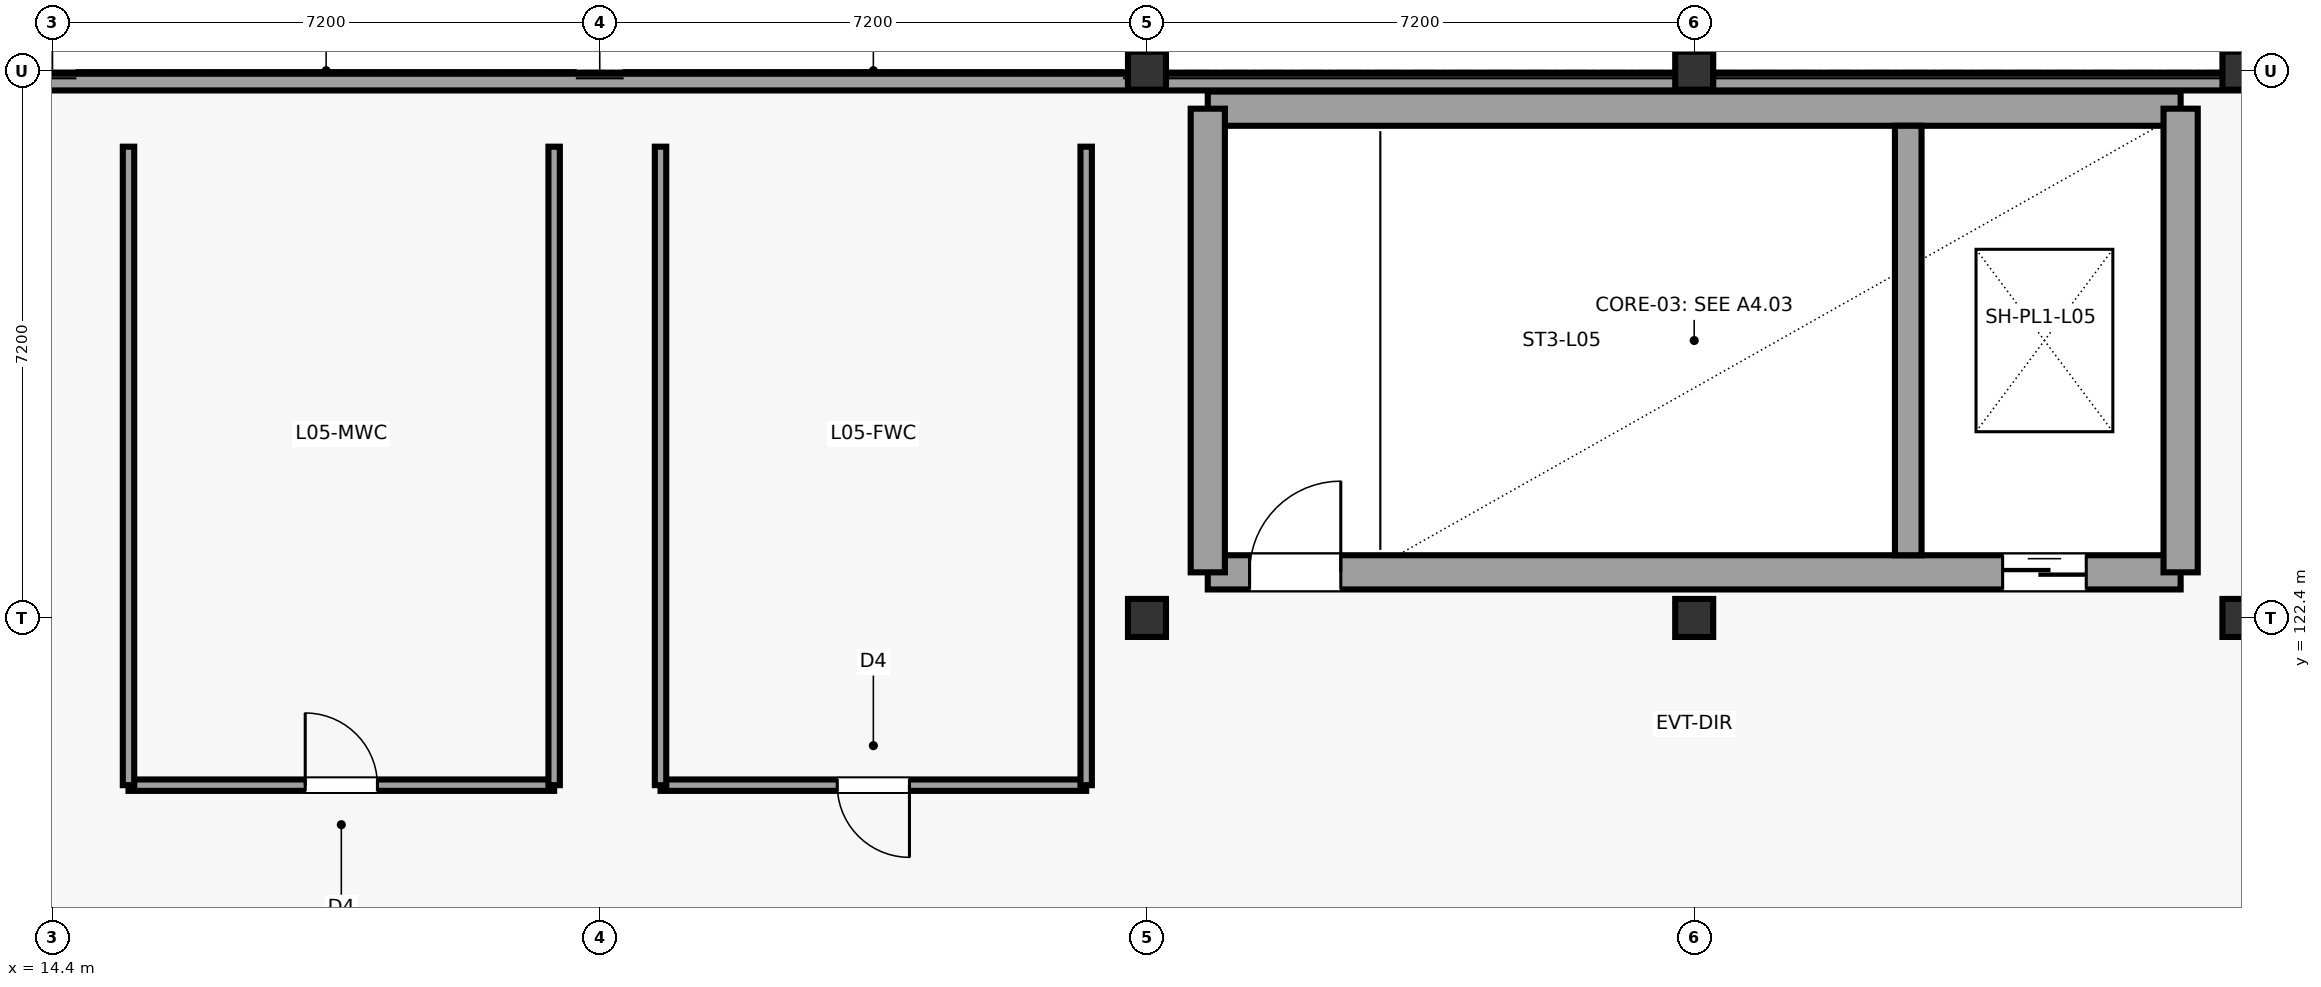
"""IFC4 building model, lengths in metres.
Left out: names, types, materials, properties, quantities, classifications, styles, units other than length and angle.
Written with IfcOpenShell. Run it as: python <this file> out.ifc"""

import sys

from ifc_helpers import new_model, si_unit, direction, frame, frame_2d, origin, origin_2d, place, context, subcontext, project, spatial, rectangle, extrude, element, fill, save


model = new_model("IFC4")
c1 = context("Model", 3, precision=1e-05, world=origin(), true_north=direction((0.0, 1.0)))
c2 = subcontext(c1, "Body", "Model", "MODEL_VIEW")
j1 = project(units=[si_unit("LENGTHUNIT", "METRE"), si_unit("PLANEANGLEUNIT", "RADIAN")], contexts=[c1])
p1 = place(None, origin())
s1 = spatial("IfcSite", under=j1, at=p1, CompositionType="ELEMENT")
p2 = place(p1, origin())
s2 = spatial("IfcBuilding", under=s1, at=p2, CompositionType="ELEMENT")
p3 = place(p2, frame((0.0, 0.0, 23.0)))
s3 = spatial("IfcBuildingStorey", under=s2, at=p3, CompositionType="ELEMENT", Elevation=23.0)
for number, where, z_axis, x_axis in (
    (1, (28.8, 122.4, 0.0), (0.0, 0.0, 1.0), (1.0, 0.0, 0.0)),
    (2, (28.8, 129.6, 0.0), (0.0, 0.0, 1.0), (1.0, 0.0, 0.0)),
    (3, (36.0, 122.4, 0.0), (0.0, 0.0, 1.0), (1.0, 0.0, 0.0)),
    (4, (36.0, 129.6, 0.0), (0.0, 0.0, 1.0), (1.0, 0.0, 0.0)),
    (5, (43.2, 122.4, 0.0), (0.0, 0.0, 1.0), (1.0, 0.0, 0.0)),
    (6, (43.2, 129.6, 0.0), (0.0, 0.0, 1.0), (1.0, 0.0, 0.0)),
):
    element("IfcColumn", number, at=place(p3, frame(where, z_axis=z_axis, x_axis=x_axis)), inside=s3, PredefinedType="COLUMN", context=c2, shape_type="SweptSolid", body=[
        extrude(rectangle(XDim=0.5, YDim=0.5, at=origin_2d()), origin(), (0.0, 0.0, 1.0), 4.5),
    ])
p4 = place(p3, frame((29.6, 123.0, 0.0), z_axis=(0.0, 0.0, 1.0), x_axis=(1.0, 0.0, 0.0)))
e7 = element("IfcWall", 7, at=p4, inside=s3, PredefinedType="SHEAR", context=c2, shape_type="SweptSolid", body=[
    extrude(rectangle(XDim=12.8, YDim=0.45, at=frame_2d((6.4, 0.0))), origin(), (0.0, 0.0, 1.0), 4.28),
])
p5 = place(p4, frame((0.55, 0.0, 0.0)))
e8 = element("IfcOpeningElement", 8, at=p5, cuts=e7, PredefinedType="OPENING", context=c2, shape_type="SweptSolid", body=[
    extrude(rectangle(XDim=1.2, YDim=2.25, at=frame_2d((0.6, 1.125))), frame((0.0, 0.235, 0.0), z_axis=(0.0, -1.0, 0.0), x_axis=(1.0, 0.0, 0.0)), (0.0, 0.0, 1.0), 0.47),
])
p6 = place(p4, frame((10.458, 0.0, 0.0)))
e9 = element("IfcOpeningElement", 9, at=p6, cuts=e7, PredefinedType="OPENING", context=c2, shape_type="SweptSolid", body=[
    extrude(rectangle(XDim=1.1, YDim=2.2, at=frame_2d((0.55, 1.1))), frame((0.0, 0.235, 0.0), z_axis=(0.0, -1.0, 0.0), x_axis=(1.0, 0.0, 0.0)), (0.0, 0.0, 1.0), 0.47),
])
p7 = place(p3, frame((29.6, 129.1, 0.0), z_axis=(0.0, 0.0, 1.0), x_axis=(1.0, 0.0, 0.0)))
e10 = element("IfcWall", 10, at=p7, inside=s3, PredefinedType="SHEAR", context=c2, shape_type="SweptSolid", body=[
    extrude(rectangle(XDim=12.8, YDim=0.45, at=frame_2d((6.4, 0.0))), origin(), (0.0, 0.0, 1.0), 4.28),
])
for number, where, z_axis, x_axis in (
    (11, (29.6, 123.0, 0.0), (0.0, 0.0, 1.0), (0.0, 1.0, 0.0)),
    (12, (42.4, 123.0, 0.0), (0.0, 0.0, 1.0), (0.0, 1.0, 0.0)),
):
    element("IfcWall", number, at=place(p3, frame(where, z_axis=z_axis, x_axis=x_axis)), inside=s3, PredefinedType="SHEAR", context=c2, shape_type="SweptSolid", body=[
        extrude(rectangle(XDim=6.1, YDim=0.45, at=frame_2d((3.05, 0.0))), origin(), (0.0, 0.0, 1.0), 4.28),
    ])
p8 = place(p3, frame((38.816, 123.225, 0.0), z_axis=(0.0, 0.0, 1.0), x_axis=(0.0, 1.0, 0.0)))
e13 = element("IfcWall", 13, at=p8, inside=s3, PredefinedType="SHEAR", context=c2, shape_type="SweptSolid", body=[
    extrude(rectangle(XDim=5.65, YDim=0.35, at=frame_2d((2.825, 0.0))), origin(), (0.0, 0.0, 1.0), 4.28),
])
p9 = place(p3, frame((0.15, 129.45, 4.5), z_axis=(0.0, 0.0, 1.0), x_axis=(1.0, 0.0, 0.0)))
e14 = element("IfcWall", 14, at=p9, inside=s3, PredefinedType="PARAPET", context=c2, shape_type="SweptSolid", body=[
    extrude(rectangle(XDim=93.3, YDim=0.22, at=frame_2d((46.65, 0.0))), origin(), (0.0, 0.0, 1.0), 1.15),
])
p10 = place(p3, frame((15.4, 120.2, 0.0), z_axis=(0.0, 0.0, 1.0), x_axis=(1.0, 0.0, 0.0)))
e15 = element("IfcWall", 15, at=p10, inside=s3, PredefinedType="PARTITIONING", context=c2, shape_type="SweptSolid", body=[
    extrude(rectangle(XDim=5.6, YDim=0.15, at=frame_2d((2.8, 0.0))), origin(), (0.0, 0.0, 1.0), 3.34),
])
p11 = place(p10, frame((2.325, 0.0, 0.0)))
e16 = element("IfcOpeningElement", 16, at=p11, cuts=e15, PredefinedType="OPENING", context=c2, shape_type="SweptSolid", body=[
    extrude(rectangle(XDim=0.95, YDim=2.15, at=frame_2d((0.475, 1.075))), frame((0.0, 0.085, 0.0), z_axis=(0.0, -1.0, 0.0), x_axis=(1.0, 0.0, 0.0)), (0.0, 0.0, 1.0), 0.17),
])
for number, where, z_axis, x_axis in (
    (17, (21.0, 120.2, 0.0), (0.0, 0.0, 1.0), (0.0, 1.0, 0.0)),
    (18, (15.4, 128.6, 0.0), (0.0, 0.0, 1.0), (0.0, -1.0, 0.0)),
):
    element("IfcWall", number, at=place(p3, frame(where, z_axis=z_axis, x_axis=x_axis)), inside=s3, PredefinedType="PARTITIONING", context=c2, shape_type="SweptSolid", body=[
        extrude(rectangle(XDim=8.4, YDim=0.15, at=frame_2d((4.2, 0.0))), origin(), (0.0, 0.0, 1.0), 3.34),
    ])
p12 = place(p3, frame((22.4, 120.2, 0.0), z_axis=(0.0, 0.0, 1.0), x_axis=(1.0, 0.0, 0.0)))
e19 = element("IfcWall", 19, at=p12, inside=s3, PredefinedType="PARTITIONING", context=c2, shape_type="SweptSolid", body=[
    extrude(rectangle(XDim=5.6, YDim=0.15, at=frame_2d((2.8, 0.0))), origin(), (0.0, 0.0, 1.0), 3.34),
])
p13 = place(p12, frame((2.325, 0.0, 0.0)))
e20 = element("IfcOpeningElement", 20, at=p13, cuts=e19, PredefinedType="OPENING", context=c2, shape_type="SweptSolid", body=[
    extrude(rectangle(XDim=0.95, YDim=2.15, at=frame_2d((0.475, 1.075))), frame((0.0, 0.085, 0.0), z_axis=(0.0, -1.0, 0.0), x_axis=(1.0, 0.0, 0.0)), (0.0, 0.0, 1.0), 0.17),
])
for number, where, z_axis, x_axis in (
    (21, (28.0, 120.2, 0.0), (0.0, 0.0, 1.0), (0.0, 1.0, 0.0)),
    (22, (22.4, 128.6, 0.0), (0.0, 0.0, 1.0), (0.0, -1.0, 0.0)),
):
    element("IfcWall", number, at=place(p3, frame(where, z_axis=z_axis, x_axis=x_axis)), inside=s3, PredefinedType="PARTITIONING", context=c2, shape_type="SweptSolid", body=[
        extrude(rectangle(XDim=8.4, YDim=0.15, at=frame_2d((4.2, 0.0))), origin(), (0.0, 0.0, 1.0), 3.34),
    ])
p14 = place(p5, origin())
e23 = element("IfcDoor", 23, at=p14, inside=s3, OperationType="SINGLE_SWING_RIGHT", PredefinedType="DOOR", context=c2, shape_type="SweptSolid", body=[
    extrude(rectangle(XDim=1.2, YDim=2.25, at=frame_2d((0.6, 1.125))), frame((0.0, 0.025, 0.0), z_axis=(0.0, -1.0, 0.0), x_axis=(1.0, 0.0, 0.0)), (0.0, 0.0, 1.0), 0.05),
])
fill(e8, e23)
p15 = place(p6, origin())
e24 = element("IfcDoor", 24, at=p15, inside=s3, OperationType="SLIDING_TO_LEFT", PredefinedType="DOOR", context=c2, shape_type="SweptSolid", body=[
    extrude(rectangle(XDim=1.1, YDim=2.2, at=frame_2d((0.55, 1.1))), frame((0.0, 0.025, 0.0), z_axis=(0.0, -1.0, 0.0), x_axis=(1.0, 0.0, 0.0)), (0.0, 0.0, 1.0), 0.05),
])
fill(e9, e24)
p16 = place(p11, origin())
e25 = element("IfcDoor", 25, at=p16, inside=s3, OperationType="SINGLE_SWING_LEFT", PredefinedType="DOOR", context=c2, shape_type="SweptSolid", body=[
    extrude(rectangle(XDim=0.95, YDim=2.15, at=frame_2d((0.475, 1.075))), frame((0.0, 0.025, 0.0), z_axis=(0.0, -1.0, 0.0), x_axis=(1.0, 0.0, 0.0)), (0.0, 0.0, 1.0), 0.05),
])
fill(e16, e25)
p17 = place(p13, frame((0.95, 0.0, 0.0), z_axis=(0.0, 0.0, 1.0), x_axis=(-1.0, 0.0, 0.0)))
e26 = element("IfcDoor", 26, at=p17, inside=s3, OperationType="SINGLE_SWING_RIGHT", PredefinedType="DOOR", context=c2, shape_type="SweptSolid", body=[
    extrude(rectangle(XDim=0.95, YDim=2.15, at=frame_2d((0.475, 1.075))), frame((0.0, 0.025, 0.0), z_axis=(0.0, -1.0, 0.0), x_axis=(1.0, 0.0, 0.0)), (0.0, 0.0, 1.0), 0.05),
])
fill(e20, e26)
save(model, sys.argv[1])
